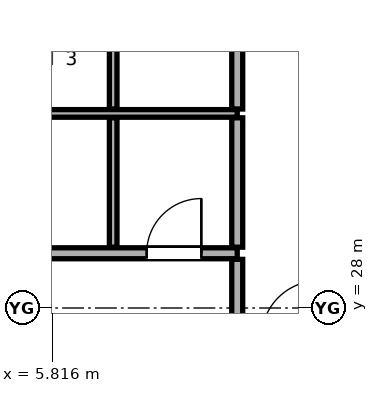
"""IFC4 building model, lengths in metres.
Left out: names, types, materials, properties, quantities, classifications, styles, units other than length and angle.
Written with IfcOpenShell. Run it as: python <this file> out.ifc"""

import sys

from ifc_helpers import new_model, si_unit, direction, frame, frame_2d, origin, place, context, subcontext, project, spatial, rectangle, extrude, element, fill, save


model = new_model("IFC4")
c1 = context("Model", 3, precision=1e-05, world=origin(), true_north=direction((0.0, 1.0)))
c2 = subcontext(c1, "Body", "Model", "MODEL_VIEW")
j1 = project(units=[si_unit("LENGTHUNIT", "METRE"), si_unit("PLANEANGLEUNIT", "RADIAN")], contexts=[c1])
p1 = place(None, origin())
s1 = spatial("IfcSite", under=j1, at=p1, CompositionType="ELEMENT")
p2 = place(p1, origin())
s2 = spatial("IfcBuilding", under=s1, at=p2, CompositionType="ELEMENT")
p3 = place(p2, frame((0.0, 0.0, 35.6)))
s3 = spatial("IfcBuildingStorey", under=s2, at=p3, CompositionType="ELEMENT", Elevation=35.6)
p4 = place(p3, frame((-1.6, 28.9, 0.0), z_axis=(0.0, 0.0, 1.0), x_axis=(1.0, 0.0, 0.0)))
e1 = element("IfcWall", 1, at=p4, inside=s3, PredefinedType="PARTITIONING", context=c2, shape_type="SweptSolid", body=[
    extrude(rectangle(XDim=10.46, YDim=0.18, at=frame_2d((5.23, 0.0))), origin(), (0.0, 0.0, 1.0), 2.125),
])
p5 = place(p4, frame((3.805, 0.0, 0.0)))
e2 = element("IfcOpeningElement", 2, at=p5, cuts=e1, PredefinedType="OPENING", context=c2, shape_type="SweptSolid", body=[
    extrude(rectangle(XDim=0.85, YDim=2.01, at=frame_2d((0.425, 1.005))), frame((0.0, 0.1, 0.0), z_axis=(0.0, -1.0, 0.0), x_axis=(1.0, 0.0, 0.0)), (0.0, 0.0, 1.0), 0.2),
])
p6 = place(p4, frame((8.97, 0.0, 0.0)))
e3 = element("IfcOpeningElement", 3, at=p6, cuts=e1, PredefinedType="OPENING", context=c2, shape_type="SweptSolid", body=[
    extrude(rectangle(XDim=0.9, YDim=2.1, at=frame_2d((0.45, 1.05))), frame((0.0, 0.1, 0.0), z_axis=(0.0, -1.0, 0.0), x_axis=(1.0, 0.0, 0.0)), (0.0, 0.0, 1.0), 0.2),
])
p7 = place(p3, frame((-1.6, 31.2, 0.0), z_axis=(0.0, 0.0, 1.0), x_axis=(1.0, 0.0, 0.0)))
e4 = element("IfcWall", 4, at=p7, inside=s3, PredefinedType="PARTITIONING", context=c2, shape_type="SweptSolid", body=[
    extrude(rectangle(XDim=10.46, YDim=0.125, at=frame_2d((5.23, 0.0))), origin(), (0.0, 0.0, 1.0), 2.125),
])
for number, where, z_axis, x_axis in (
    (5, (6.82, 29.0, 0.0), (0.0, 0.0, 1.0), (0.0, 1.0, 0.0)),
    (6, (6.82, 31.272, 0.0), (0.0, 0.0, 1.0), (0.0, 1.0, 0.0)),
):
    element("IfcWall", number, at=place(p3, frame(where, z_axis=z_axis, x_axis=x_axis)), inside=s3, PredefinedType="PARTITIONING", context=c2, shape_type="SweptSolid", body=[
        extrude(rectangle(XDim=2.127, YDim=0.125, at=frame_2d((1.064, 0.0))), origin(), (0.0, 0.0, 1.0), 2.279),
    ])
p8 = place(p3, frame((8.86, 24.9, 0.0), z_axis=(0.0, 0.0, 1.0), x_axis=(0.0, 1.0, 0.0)))
e7 = element("IfcWall", 7, at=p8, inside=s3, PredefinedType="PARTITIONING", context=c2, shape_type="SweptSolid", body=[
    extrude(rectangle(XDim=3.9, YDim=0.18, at=frame_2d((1.95, 0.0))), origin(), (0.0, 0.0, 1.0), 2.279),
])
p9 = place(p8, frame((1.425, 0.0, 0.0)))
e8 = element("IfcOpeningElement", 8, at=p9, cuts=e7, PredefinedType="OPENING", context=c2, shape_type="SweptSolid", body=[
    extrude(rectangle(XDim=1.05, YDim=2.2, at=frame_2d((0.525, 1.1))), frame((0.0, 0.1, 0.0), z_axis=(0.0, -1.0, 0.0), x_axis=(1.0, 0.0, 0.0)), (0.0, 0.0, 1.0), 0.2),
])
for number, where, z_axis, x_axis in (
    (9, (8.86, 29.0, 0.0), (0.0, 0.0, 1.0), (0.0, 1.0, 0.0)),
    (10, (8.86, 31.272, 0.0), (0.0, 0.0, 1.0), (0.0, 1.0, 0.0)),
):
    element("IfcWall", number, at=place(p3, frame(where, z_axis=z_axis, x_axis=x_axis)), inside=s3, PredefinedType="PARTITIONING", context=c2, shape_type="SweptSolid", body=[
        extrude(rectangle(XDim=2.127, YDim=0.18, at=frame_2d((1.064, 0.0))), origin(), (0.0, 0.0, 1.0), 2.279),
    ])
p10 = place(p6, origin())
e11 = element("IfcDoor", 11, at=p10, inside=s3, OperationType="SINGLE_SWING_RIGHT", PredefinedType="DOOR", context=c2, shape_type="SweptSolid", body=[
    extrude(rectangle(XDim=0.9, YDim=2.1, at=frame_2d((0.45, 1.05))), frame((0.0, 0.025, 0.0), z_axis=(0.0, -1.0, 0.0), x_axis=(1.0, 0.0, 0.0)), (0.0, 0.0, 1.0), 0.05),
])
fill(e3, e11)
save(model, sys.argv[1])
